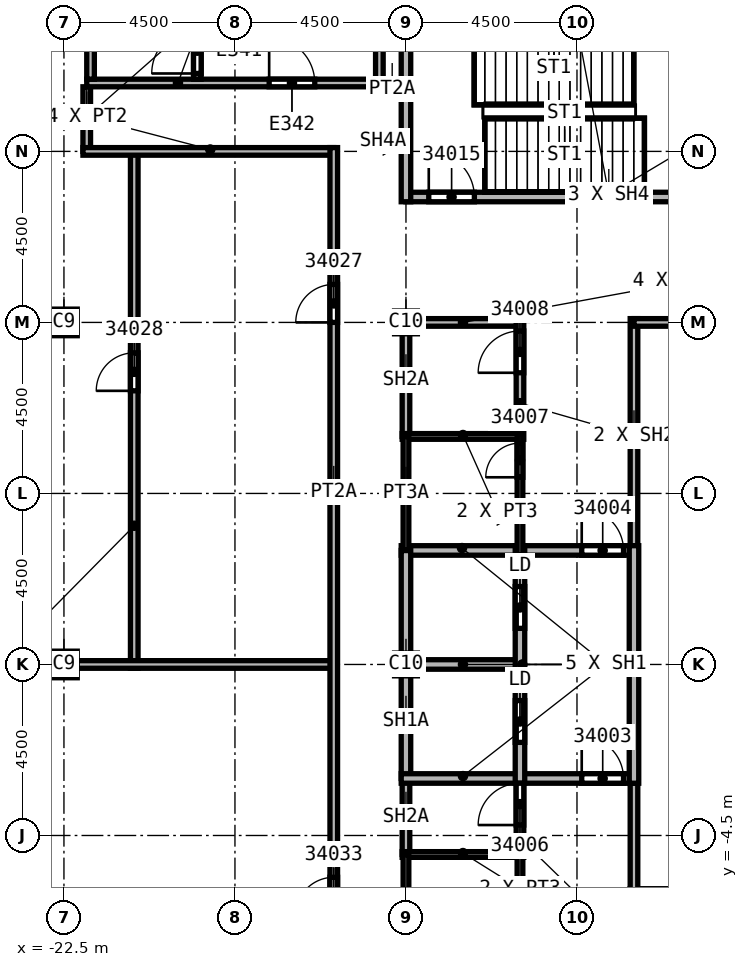
"""IFC4 building model, lengths in metres.
Left out: names, types, materials, properties, quantities, classifications, styles, units other than length and angle.
Written with IfcOpenShell. Run it as: python <this file> out.ifc"""

import sys

from ifc_helpers import new_model, si_unit, direction, frame, frame_2d, origin, origin_2d, place, context, subcontext, project, spatial, rectangle, extrude, element, fill, save


model = new_model("IFC4")
c1 = context("Model", 3, precision=1e-05, world=origin(), true_north=direction((0.0, 1.0)))
c2 = subcontext(c1, "Body", "Model", "MODEL_VIEW")
j1 = project(units=[si_unit("LENGTHUNIT", "METRE"), si_unit("PLANEANGLEUNIT", "RADIAN")], contexts=[c1])
p1 = place(None, origin())
s1 = spatial("IfcSite", under=j1, at=p1, CompositionType="ELEMENT")
p2 = place(p1, origin())
s2 = spatial("IfcBuilding", under=s1, at=p2, CompositionType="ELEMENT")
p3 = place(p2, frame((0.0, 0.0, 366.0)))
s3 = spatial("IfcBuildingStorey", under=s2, at=p3, CompositionType="ELEMENT", Elevation=366.0)
for number, where, z_axis, x_axis in (
    (1, (-22.5, 0.0, 0.0), (0.0, 0.0, 1.0), (1.0, 0.0, 0.0)),
    (2, (-22.5, 9.0, 0.0), (0.0, 0.0, 1.0), (1.0, 0.0, 0.0)),
):
    element("IfcColumn", number, at=place(p3, frame(where, z_axis=z_axis, x_axis=x_axis)), inside=s3, PredefinedType="COLUMN", context=c2, shape_type="SweptSolid", body=[
        extrude(rectangle(XDim=0.7, YDim=0.7, at=origin_2d()), origin(), (0.0, 0.0, 1.0), 9.6),
    ])
for number, where, z_axis, x_axis in (
    (3, (-13.5, 0.0, 0.0), (0.0, 0.0, 1.0), (1.0, 0.0, 0.0)),
    (4, (-13.5, 9.0, 0.0), (0.0, 0.0, 1.0), (1.0, 0.0, 0.0)),
):
    element("IfcColumn", number, at=place(p3, frame(where, z_axis=z_axis, x_axis=x_axis)), inside=s3, PredefinedType="COLUMN", context=c2, shape_type="SweptSolid", body=[
        extrude(rectangle(XDim=0.6, YDim=0.6, at=origin_2d()), origin(), (0.0, 0.0, 1.0), 9.6),
    ])
p4 = place(p3, frame((-21.9, 13.5, 0.0), z_axis=(0.0, 0.0, 1.0), x_axis=(0.0, 1.0, 0.0)))
e5 = element("IfcWall", 5, at=p4, inside=s3, PredefinedType="PARTITIONING", context=c2, shape_type="SweptSolid", body=[
    extrude(rectangle(XDim=1.7, YDim=0.2, at=frame_2d((0.85, 0.0))), origin(), (0.0, 0.0, 1.0), 9.15),
])
p5 = place(p3, frame((-20.65, -0.1, 0.0), z_axis=(0.0, 0.0, 1.0), x_axis=(0.0, 1.0, 0.0)))
e6 = element("IfcWall", 6, at=p5, inside=s3, PredefinedType="PARTITIONING", context=c2, shape_type="SweptSolid", body=[
    extrude(rectangle(XDim=13.6, YDim=0.2, at=frame_2d((6.8, 0.0))), origin(), (0.0, 0.0, 1.0), 9.15),
])
p6 = place(p5, frame((7.3, 0.0, 0.0)))
e7 = element("IfcOpeningElement", 7, at=p6, cuts=e6, PredefinedType="OPENING", context=c2, shape_type="SweptSolid", body=[
    extrude(rectangle(XDim=1.0, YDim=2.1, at=frame_2d((0.5, 1.05))), frame((0.0, 0.1, 0.0), z_axis=(0.0, -1.0, 0.0), x_axis=(1.0, 0.0, 0.0)), (0.0, 0.0, 1.0), 0.2),
])
p7 = place(p3, frame((-15.4, 0.0, 0.0), z_axis=(0.0, 0.0, 1.0), x_axis=(-1.0, 0.0, 0.0)))
e8 = element("IfcWall", 8, at=p7, inside=s3, PredefinedType="PARTITIONING", context=c2, shape_type="SweptSolid", body=[
    extrude(rectangle(XDim=11.15, YDim=0.2, at=frame_2d((5.575, 0.0))), origin(), (0.0, 0.0, 1.0), 9.15),
])
p8 = place(p3, frame((-15.4, 13.5, 0.0), z_axis=(0.0, 0.0, 1.0), x_axis=(-1.0, 0.0, 0.0)))
e9 = element("IfcWall", 9, at=p8, inside=s3, PredefinedType="PARTITIONING", context=c2, shape_type="SweptSolid", body=[
    extrude(rectangle(XDim=6.6, YDim=0.2, at=frame_2d((3.3, 0.0))), origin(), (0.0, 0.0, 1.0), 9.15),
])
p9 = place(p3, frame((-15.4, -27.45, 0.0), z_axis=(0.0, 0.0, 1.0), x_axis=(0.0, 1.0, 0.0)))
e10 = element("IfcWall", 10, at=p9, inside=s3, PredefinedType="PARTITIONING", context=c2, shape_type="SweptSolid", body=[
    extrude(rectangle(XDim=41.05, YDim=0.2, at=frame_2d((20.525, 0.0))), origin(), (0.0, 0.0, 1.0), 5.76),
])
p10 = place(p9, frame((36.45, 0.0, 0.0)))
e11 = element("IfcOpeningElement", 11, at=p10, cuts=e10, PredefinedType="OPENING", context=c2, shape_type="SweptSolid", body=[
    extrude(rectangle(XDim=1.0, YDim=2.1, at=frame_2d((0.5, 1.05))), frame((0.0, 0.1, 0.0), z_axis=(0.0, -1.0, 0.0), x_axis=(1.0, 0.0, 0.0)), (0.0, 0.0, 1.0), 0.2),
])
p11 = place(p9, frame((4.0, 0.0, 0.0)))
e12 = element("IfcOpeningElement", 12, at=p11, cuts=e10, PredefinedType="OPENING", context=c2, shape_type="SweptSolid", body=[
    extrude(rectangle(XDim=1.0, YDim=2.1, at=frame_2d((0.5, 1.05))), frame((0.0, 0.1, 0.0), z_axis=(0.0, -1.0, 0.0), x_axis=(1.0, 0.0, 0.0)), (0.0, 0.0, 1.0), 0.2),
])
p12 = place(p9, frame((10.05, 0.0, 0.0)))
e13 = element("IfcOpeningElement", 13, at=p12, cuts=e10, PredefinedType="OPENING", context=c2, shape_type="SweptSolid", body=[
    extrude(rectangle(XDim=1.0, YDim=2.1, at=frame_2d((0.5, 1.05))), frame((0.0, 0.1, 0.0), z_axis=(0.0, -1.0, 0.0), x_axis=(1.0, 0.0, 0.0)), (0.0, 0.0, 1.0), 0.2),
])
p13 = place(p9, frame((15.9, 0.0, 0.0)))
e14 = element("IfcOpeningElement", 14, at=p13, cuts=e10, PredefinedType="OPENING", context=c2, shape_type="SweptSolid", body=[
    extrude(rectangle(XDim=1.0, YDim=2.1, at=frame_2d((0.5, 1.05))), frame((0.0, 0.1, 0.0), z_axis=(0.0, -1.0, 0.0), x_axis=(1.0, 0.0, 0.0)), (0.0, 0.0, 1.0), 0.2),
])
p14 = place(p9, frame((20.85, 0.0, 0.0)))
e15 = element("IfcOpeningElement", 15, at=p14, cuts=e10, PredefinedType="OPENING", context=c2, shape_type="SweptSolid", body=[
    extrude(rectangle(XDim=1.0, YDim=2.1, at=frame_2d((0.5, 1.05))), frame((0.0, 0.1, 0.0), z_axis=(0.0, -1.0, 0.0), x_axis=(1.0, 0.0, 0.0)), (0.0, 0.0, 1.0), 0.2),
])
p15 = place(p3, frame((-14.1, 15.2, 0.0), z_axis=(0.0, 0.0, 1.0), x_axis=(1.0, 0.0, 0.0)))
e16 = element("IfcWall", 16, at=p15, inside=s3, PredefinedType="PARTITIONING", context=c2, shape_type="SweptSolid", body=[
    extrude(rectangle(XDim=0.725, YDim=0.2, at=frame_2d((0.363, 0.0))), origin(), (0.0, 0.0, 1.0), 5.76),
])
p16 = place(p3, frame((-13.5, -5.0, 0.0), z_axis=(0.0, 0.0, 1.0), x_axis=(0.0, 1.0, 0.0)))
e17 = element("IfcWall", 17, at=p16, inside=s3, PredefinedType="SOLIDWALL", context=c2, shape_type="SweptSolid", body=[
    extrude(rectangle(XDim=2.0, YDim=0.2, at=frame_2d((1.0, 0.0))), origin(), (0.0, 0.0, 1.0), 5.76),
])
p17 = place(p3, frame((-13.5, 6.0, 0.0), z_axis=(0.0, 0.0, 1.0), x_axis=(0.0, 1.0, 0.0)))
e18 = element("IfcWall", 18, at=p17, inside=s3, PredefinedType="SOLIDWALL", context=c2, shape_type="SweptSolid", body=[
    extrude(rectangle(XDim=3.1, YDim=0.2, at=frame_2d((1.55, 0.0))), origin(), (0.0, 0.0, 1.0), 5.76),
])
p18 = place(p3, frame((-13.5, 9.0, 0.0), z_axis=(0.0, 0.0, 1.0), x_axis=(1.0, 0.0, 0.0)))
e19 = element("IfcWall", 19, at=p18, inside=s3, PredefinedType="SOLIDWALL", context=c2, shape_type="SweptSolid", body=[
    extrude(rectangle(XDim=3.0, YDim=0.2, at=frame_2d((1.5, 0.0))), origin(), (0.0, 0.0, 1.0), 8.838),
])
p19 = place(p3, frame((-10.5, -5.075, 0.0), z_axis=(0.0, 0.0, 1.0), x_axis=(0.0, 1.0, 0.0)))
e20 = element("IfcWall", 20, at=p19, inside=s3, PredefinedType="SOLIDWALL", context=c2, shape_type="SweptSolid", body=[
    extrude(rectangle(XDim=2.2, YDim=0.2, at=frame_2d((1.1, 0.0))), origin(), (0.0, 0.0, 1.0), 9.15),
])
p20 = place(p19, frame((0.85, 0.0, 0.0)))
e21 = element("IfcOpeningElement", 21, at=p20, cuts=e20, PredefinedType="OPENING", context=c2, shape_type="SweptSolid", body=[
    extrude(rectangle(XDim=1.1, YDim=2.1, at=frame_2d((0.55, 1.05))), frame((0.0, 0.1, 0.0), z_axis=(0.0, -1.0, 0.0), x_axis=(1.0, 0.0, 0.0)), (0.0, 0.0, 1.0), 0.2),
])
p21 = place(p3, frame((-10.5, 5.925, 0.0), z_axis=(0.0, 0.0, 1.0), x_axis=(0.0, 1.0, 0.0)))
e22 = element("IfcWall", 22, at=p21, inside=s3, PredefinedType="SOLIDWALL", context=c2, shape_type="SweptSolid", body=[
    extrude(rectangle(XDim=3.175, YDim=0.2, at=frame_2d((1.587, 0.0))), origin(), (0.0, 0.0, 1.0), 9.15),
])
p22 = place(p21, frame((1.75, 0.0, 0.0)))
e23 = element("IfcOpeningElement", 23, at=p22, cuts=e22, PredefinedType="OPENING", context=c2, shape_type="SweptSolid", body=[
    extrude(rectangle(XDim=1.1, YDim=2.1, at=frame_2d((0.55, 1.05))), frame((0.0, 0.1, 0.0), z_axis=(0.0, -1.0, 0.0), x_axis=(1.0, 0.0, 0.0)), (0.0, 0.0, 1.0), 0.2),
])
for number, where, z_axis, x_axis in (
    (24, (-7.5, -9.1, 0.0), (0.0, 0.0, 1.0), (0.0, 1.0, 0.0)),
    (25, (-7.5, 2.875, 0.0), (0.0, 0.0, 1.0), (0.0, 1.0, 0.0)),
):
    element("IfcWall", number, at=place(p3, frame(where, z_axis=z_axis, x_axis=x_axis)), inside=s3, PredefinedType="SOLIDWALL", context=c2, shape_type="SweptSolid", body=[
        extrude(rectangle(XDim=6.225, YDim=0.2, at=frame_2d((3.113, 0.0))), origin(), (0.0, 0.0, 1.0), 9.15),
    ])
p23 = place(p3, frame((-7.5, 9.0, 0.0), z_axis=(0.0, 0.0, 1.0), x_axis=(1.0, 0.0, 0.0)))
e26 = element("IfcWall", 26, at=p23, inside=s3, PredefinedType="SOLIDWALL", context=c2, shape_type="SweptSolid", body=[
    extrude(rectangle(XDim=3.0, YDim=0.2, at=frame_2d((1.5, 0.0))), origin(), (0.0, 0.0, 1.0), 8.838),
])
p24 = place(p3, frame((-13.625, 0.0, 0.0), z_axis=(0.0, 0.0, 1.0), x_axis=(1.0, 0.0, 0.0)))
e27 = element("IfcWall", 27, at=p24, inside=s3, PredefinedType="SOLIDWALL", context=c2, shape_type="SweptSolid", body=[
    extrude(rectangle(XDim=3.125, YDim=0.25, at=frame_2d((1.562, 0.0))), origin(), (0.0, 0.0, 1.0), 9.15),
])
p25 = place(p3, frame((-13.625, 3.0, 0.0), z_axis=(0.0, 0.0, 1.0), x_axis=(1.0, 0.0, 0.0)))
e28 = element("IfcWall", 28, at=p25, inside=s3, PredefinedType="SOLIDWALL", context=c2, shape_type="SweptSolid", body=[
    extrude(rectangle(XDim=6.125, YDim=0.25, at=frame_2d((3.062, 0.0))), origin(), (0.0, 0.0, 1.0), 9.15),
])
p26 = place(p25, frame((4.75, 0.0, 0.0)))
e29 = element("IfcOpeningElement", 29, at=p26, cuts=e28, PredefinedType="OPENING", context=c2, shape_type="SweptSolid", body=[
    extrude(rectangle(XDim=1.1, YDim=2.1, at=frame_2d((0.55, 1.05))), frame((0.0, 0.125, 0.0), z_axis=(0.0, -1.0, 0.0), x_axis=(1.0, 0.0, 0.0)), (0.0, 0.0, 1.0), 0.25),
])
p27 = place(p3, frame((-13.5, -3.0, 0.0), z_axis=(0.0, 0.0, 1.0), x_axis=(0.0, 1.0, 0.0)))
e30 = element("IfcWall", 30, at=p27, inside=s3, PredefinedType="SOLIDWALL", context=c2, shape_type="SweptSolid", body=[
    extrude(rectangle(XDim=6.0, YDim=0.25, at=frame_2d((3.0, 0.0))), origin(), (0.0, 0.0, 1.0), 5.76),
])
p28 = place(p3, frame((-13.625, -3.0, 0.0), z_axis=(0.0, 0.0, 1.0), x_axis=(1.0, 0.0, 0.0)))
e31 = element("IfcWall", 31, at=p28, inside=s3, PredefinedType="SOLIDWALL", context=c2, shape_type="SweptSolid", body=[
    extrude(rectangle(XDim=6.125, YDim=0.25, at=frame_2d((3.062, 0.0))), origin(), (0.0, 0.0, 1.0), 9.15),
])
p29 = place(p28, frame((4.75, 0.0, 0.0)))
e32 = element("IfcOpeningElement", 32, at=p29, cuts=e31, PredefinedType="OPENING", context=c2, shape_type="SweptSolid", body=[
    extrude(rectangle(XDim=1.1, YDim=2.1, at=frame_2d((0.55, 1.05))), frame((0.0, 0.125, 0.0), z_axis=(0.0, -1.0, 0.0), x_axis=(1.0, 0.0, 0.0)), (0.0, 0.0, 1.0), 0.25),
])
p30 = place(p3, frame((-10.5, -3.125, 0.0), z_axis=(0.0, 0.0, 1.0), x_axis=(0.0, 1.0, 0.0)))
e33 = element("IfcWall", 33, at=p30, inside=s3, PredefinedType="SOLIDWALL", context=c2, shape_type="SweptSolid", body=[
    extrude(rectangle(XDim=6.25, YDim=0.25, at=frame_2d((3.125, 0.0))), origin(), (0.0, 0.0, 1.0), 9.15),
])
p31 = place(p30, frame((1.075, 0.0, 0.0)))
e34 = element("IfcOpeningElement", 34, at=p31, cuts=e33, PredefinedType="OPENING", context=c2, shape_type="SweptSolid", body=[
    extrude(rectangle(XDim=1.1, YDim=2.1, at=frame_2d((0.55, 1.05))), frame((0.0, 0.125, 0.0), z_axis=(0.0, -1.0, 0.0), x_axis=(1.0, 0.0, 0.0)), (0.0, 0.0, 1.0), 0.25),
])
p32 = place(p30, frame((4.075, 0.0, 0.0)))
e35 = element("IfcOpeningElement", 35, at=p32, cuts=e33, PredefinedType="OPENING", context=c2, shape_type="SweptSolid", body=[
    extrude(rectangle(XDim=1.1, YDim=2.1, at=frame_2d((0.55, 1.05))), frame((0.0, 0.125, 0.0), z_axis=(0.0, -1.0, 0.0), x_axis=(1.0, 0.0, 0.0)), (0.0, 0.0, 1.0), 0.25),
])
p33 = place(p3, frame((-7.5, -3.125, 0.0), z_axis=(0.0, 0.0, 1.0), x_axis=(0.0, 1.0, 0.0)))
e36 = element("IfcWall", 36, at=p33, inside=s3, PredefinedType="SOLIDWALL", context=c2, shape_type="SweptSolid", body=[
    extrude(rectangle(XDim=6.25, YDim=0.25, at=frame_2d((3.125, 0.0))), origin(), (0.0, 0.0, 1.0), 9.15),
])
p34 = place(p3, frame((-13.5, 12.3, 0.0), z_axis=(0.0, 0.0, 1.0), x_axis=(1.0, 0.0, 0.0)))
e37 = element("IfcWall", 37, at=p34, inside=s3, PredefinedType="SOLIDWALL", context=c2, shape_type="SweptSolid", body=[
    extrude(rectangle(XDim=9.125, YDim=0.25, at=frame_2d((4.562, 0.0))), origin(), (0.0, 0.0, 1.0), 9.15),
])
p35 = place(p34, frame((0.6, 0.0, 0.0)))
e38 = element("IfcOpeningElement", 38, at=p35, cuts=e37, PredefinedType="OPENING", context=c2, shape_type="SweptSolid", body=[
    extrude(rectangle(XDim=1.2, YDim=2.1, at=frame_2d((0.6, 1.05))), frame((0.0, 0.125, 0.0), z_axis=(0.0, -1.0, 0.0), x_axis=(1.0, 0.0, 0.0)), (0.0, 0.0, 1.0), 0.25),
])
p36 = place(p3, frame((-13.5, 12.175, 0.0), z_axis=(0.0, 0.0, 1.0), x_axis=(0.0, 1.0, 0.0)))
e39 = element("IfcWall", 39, at=p36, inside=s3, PredefinedType="SOLIDWALL", context=c2, shape_type="SweptSolid", body=[
    extrude(rectangle(XDim=4.75, YDim=0.25, at=frame_2d((2.375, 0.0))), origin(), (0.0, 0.0, 1.0), 5.76),
])
for number, where, z_axis, x_axis in (
    (40, (-13.6, -5.0, 0.0), (0.0, 0.0, 1.0), (1.0, 0.0, 0.0)),
    (41, (-13.6, 6.0, 0.0), (0.0, 0.0, 1.0), (1.0, 0.0, 0.0)),
):
    element("IfcWall", number, at=place(p3, frame(where, z_axis=z_axis, x_axis=x_axis)), inside=s3, PredefinedType="PARTITIONING", context=c2, shape_type="SweptSolid", body=[
        extrude(rectangle(XDim=3.1, YDim=0.15, at=frame_2d((1.55, 0.0))), origin(), (0.0, 0.0, 1.0), 9.15),
    ])
p37 = place(p3, frame((-13.5, -9.075, 0.0), z_axis=(0.0, 0.0, 1.0), x_axis=(0.0, 1.0, 0.0)))
e42 = element("IfcWall", 42, at=p37, inside=s3, PredefinedType="PARTITIONING", context=c2, shape_type="SweptSolid", body=[
    extrude(rectangle(XDim=4.075, YDim=0.15, at=frame_2d((2.038, 0.0))), origin(), (0.0, 0.0, 1.0), 5.76),
])
p38 = place(p3, frame((-13.5, 3.0, 0.0), z_axis=(0.0, 0.0, 1.0), x_axis=(0.0, 1.0, 0.0)))
e43 = element("IfcWall", 43, at=p38, inside=s3, PredefinedType="PARTITIONING", context=c2, shape_type="SweptSolid", body=[
    extrude(rectangle(XDim=3.0, YDim=0.15, at=frame_2d((1.5, 0.0))), origin(), (0.0, 0.0, 1.0), 5.76),
])
p39 = place(p3, frame((-10.5, -9.075, 0.0), z_axis=(0.0, 0.0, 1.0), x_axis=(0.0, 1.0, 0.0)))
e44 = element("IfcWall", 44, at=p39, inside=s3, PredefinedType="PARTITIONING", context=c2, shape_type="SweptSolid", body=[
    extrude(rectangle(XDim=4.15, YDim=0.15, at=frame_2d((2.075, 0.0))), origin(), (0.0, 0.0, 1.0), 9.15),
])
p40 = place(p39, frame((0.25, 0.0, 0.0)))
e45 = element("IfcOpeningElement", 45, at=p40, cuts=e44, PredefinedType="OPENING", context=c2, shape_type="SweptSolid", body=[
    extrude(rectangle(XDim=0.9, YDim=2.1, at=frame_2d((0.45, 1.05))), frame((0.0, 0.075, 0.0), z_axis=(0.0, -1.0, 0.0), x_axis=(1.0, 0.0, 0.0)), (0.0, 0.0, 1.0), 0.15),
])
p41 = place(p3, frame((-10.5, 2.875, 0.0), z_axis=(0.0, 0.0, 1.0), x_axis=(0.0, 1.0, 0.0)))
e46 = element("IfcWall", 46, at=p41, inside=s3, PredefinedType="PARTITIONING", context=c2, shape_type="SweptSolid", body=[
    extrude(rectangle(XDim=3.2, YDim=0.15, at=frame_2d((1.6, 0.0))), origin(), (0.0, 0.0, 1.0), 9.15),
])
p42 = place(p41, frame((2.05, 0.0, 0.0)))
e47 = element("IfcOpeningElement", 47, at=p42, cuts=e46, PredefinedType="OPENING", context=c2, shape_type="SweptSolid", body=[
    extrude(rectangle(XDim=0.9, YDim=2.1, at=frame_2d((0.45, 1.05))), frame((0.0, 0.075, 0.0), z_axis=(0.0, -1.0, 0.0), x_axis=(1.0, 0.0, 0.0)), (0.0, 0.0, 1.0), 0.15),
])
p43 = place(p3, frame((-21.9, 15.3, 0.0), z_axis=(0.0, 0.0, 1.0), x_axis=(1.0, 0.0, 0.0)))
e48 = element("IfcWall", 48, at=p43, inside=s3, PredefinedType="SOLIDWALL", context=c2, shape_type="SweptSolid", body=[
    extrude(rectangle(XDim=8.275, YDim=0.2, at=frame_2d((4.137, 0.0))), origin(), (0.0, 0.0, 1.0), 9.15),
])
p44 = place(p43, frame((4.8, 0.0, 0.0)))
e49 = element("IfcOpeningElement", 49, at=p44, cuts=e48, PredefinedType="OPENING", context=c2, shape_type="SweptSolid", body=[
    extrude(rectangle(XDim=1.2, YDim=2.1, at=frame_2d((0.6, 1.05))), frame((0.0, 0.1, 0.0), z_axis=(0.0, -1.0, 0.0), x_axis=(1.0, 0.0, 0.0)), (0.0, 0.0, 1.0), 0.2),
])
for number, where, z_axis, x_axis in (
    (50, (-21.8, 15.4, 0.0), (0.0, 0.0, 1.0), (0.0, 1.0, 0.0)),
    (51, (-14.2, 15.4, 0.0), (0.0, 0.0, 1.0), (0.0, 1.0, 0.0)),
):
    element("IfcWall", number, at=place(p3, frame(where, z_axis=z_axis, x_axis=x_axis)), inside=s3, PredefinedType="SOLIDWALL", context=c2, shape_type="SweptSolid", body=[
        extrude(rectangle(XDim=5.9, YDim=0.2, at=frame_2d((2.95, 0.0))), origin(), (0.0, 0.0, 1.0), 9.15),
    ])
p45 = place(p3, frame((-18.99, 15.4, 0.0), z_axis=(0.0, 0.0, 1.0), x_axis=(0.0, 1.0, 0.0)))
e52 = element("IfcWall", 52, at=p45, inside=s3, PredefinedType="SOLIDWALL", context=c2, shape_type="SweptSolid", body=[
    extrude(rectangle(XDim=5.9, YDim=0.2, at=frame_2d((2.95, 0.0))), origin(), (0.0, 0.0, 1.0), 9.15),
])
p46 = place(p45, frame((0.15, 0.0, 0.0)))
e53 = element("IfcOpeningElement", 53, at=p46, cuts=e52, PredefinedType="OPENING", context=c2, shape_type="SweptSolid", body=[
    extrude(rectangle(XDim=1.2, YDim=2.1, at=frame_2d((0.6, 1.05))), frame((0.0, 0.1, 0.0), z_axis=(0.0, -1.0, 0.0), x_axis=(1.0, 0.0, 0.0)), (0.0, 0.0, 1.0), 0.2),
])
p47 = place(p29, origin())
e54 = element("IfcDoor", 54, at=p47, inside=s3, OperationType="SINGLE_SWING_RIGHT", PredefinedType="DOOR", context=c2, shape_type="SweptSolid", body=[
    extrude(rectangle(XDim=1.1, YDim=2.1, at=frame_2d((0.55, 1.05))), frame((0.0, 0.025, 0.0), z_axis=(0.0, -1.0, 0.0), x_axis=(1.0, 0.0, 0.0)), (0.0, 0.0, 1.0), 0.05),
])
fill(e32, e54)
p48 = place(p26, origin())
e55 = element("IfcDoor", 55, at=p48, inside=s3, OperationType="SINGLE_SWING_LEFT", PredefinedType="DOOR", context=c2, shape_type="SweptSolid", body=[
    extrude(rectangle(XDim=1.1, YDim=2.1, at=frame_2d((0.55, 1.05))), frame((0.0, 0.025, 0.0), z_axis=(0.0, -1.0, 0.0), x_axis=(1.0, 0.0, 0.0)), (0.0, 0.0, 1.0), 0.05),
])
fill(e29, e55)
p49 = place(p20, origin())
e56 = element("IfcDoor", 56, at=p49, inside=s3, OperationType="SINGLE_SWING_LEFT", PredefinedType="DOOR", context=c2, shape_type="SweptSolid", body=[
    extrude(rectangle(XDim=1.1, YDim=2.1, at=frame_2d((0.55, 1.05))), frame((0.0, 0.025, 0.0), z_axis=(0.0, -1.0, 0.0), x_axis=(1.0, 0.0, 0.0)), (0.0, 0.0, 1.0), 0.05),
])
fill(e21, e56)
p50 = place(p42, origin())
e57 = element("IfcDoor", 57, at=p50, inside=s3, OperationType="SINGLE_SWING_RIGHT", PredefinedType="DOOR", context=c2, shape_type="SweptSolid", body=[
    extrude(rectangle(XDim=0.9, YDim=2.1, at=frame_2d((0.45, 1.05))), frame((0.0, 0.025, 0.0), z_axis=(0.0, -1.0, 0.0), x_axis=(1.0, 0.0, 0.0)), (0.0, 0.0, 1.0), 0.05),
])
fill(e47, e57)
p51 = place(p22, origin())
e58 = element("IfcDoor", 58, at=p51, inside=s3, OperationType="SINGLE_SWING_LEFT", PredefinedType="DOOR", context=c2, shape_type="SweptSolid", body=[
    extrude(rectangle(XDim=1.1, YDim=2.1, at=frame_2d((0.55, 1.05))), frame((0.0, 0.025, 0.0), z_axis=(0.0, -1.0, 0.0), x_axis=(1.0, 0.0, 0.0)), (0.0, 0.0, 1.0), 0.05),
])
fill(e23, e58)
p52 = place(p35, origin())
e59 = element("IfcDoor", 59, at=p52, inside=s3, OperationType="SINGLE_SWING_RIGHT", PredefinedType="DOOR", context=c2, shape_type="SweptSolid", body=[
    extrude(rectangle(XDim=1.2, YDim=2.1, at=frame_2d((0.6, 1.05))), frame((0.0, 0.025, 0.0), z_axis=(0.0, -1.0, 0.0), x_axis=(1.0, 0.0, 0.0)), (0.0, 0.0, 1.0), 0.05),
])
fill(e38, e59)
p53 = place(p10, origin())
e60 = element("IfcDoor", 60, at=p53, inside=s3, OperationType="SINGLE_SWING_RIGHT", PredefinedType="DOOR", context=c2, shape_type="SweptSolid", body=[
    extrude(rectangle(XDim=1.0, YDim=2.1, at=frame_2d((0.5, 1.05))), frame((0.0, 0.025, 0.0), z_axis=(0.0, -1.0, 0.0), x_axis=(1.0, 0.0, 0.0)), (0.0, 0.0, 1.0), 0.05),
])
fill(e11, e60)
p54 = place(p6, origin())
e61 = element("IfcDoor", 61, at=p54, inside=s3, OperationType="SINGLE_SWING_LEFT", PredefinedType="DOOR", context=c2, shape_type="SweptSolid", body=[
    extrude(rectangle(XDim=1.0, YDim=2.1, at=frame_2d((0.5, 1.05))), frame((0.0, 0.025, 0.0), z_axis=(0.0, -1.0, 0.0), x_axis=(1.0, 0.0, 0.0)), (0.0, 0.0, 1.0), 0.05),
])
fill(e7, e61)
p55 = place(p14, origin())
e62 = element("IfcDoor", 62, at=p55, inside=s3, OperationType="SINGLE_SWING_RIGHT", PredefinedType="DOOR", context=c2, shape_type="SweptSolid", body=[
    extrude(rectangle(XDim=1.0, YDim=2.1, at=frame_2d((0.5, 1.05))), frame((0.0, 0.025, 0.0), z_axis=(0.0, -1.0, 0.0), x_axis=(1.0, 0.0, 0.0)), (0.0, 0.0, 1.0), 0.05),
])
fill(e15, e62)
p56 = place(p31, origin())
e63 = element("IfcDoor", 63, at=p56, inside=s3, OperationType="SLIDING_TO_LEFT", PredefinedType="DOOR", context=c2, shape_type="SweptSolid", body=[
    extrude(rectangle(XDim=1.1, YDim=2.1, at=frame_2d((0.55, 1.05))), frame((0.0, 0.025, 0.0), z_axis=(0.0, -1.0, 0.0), x_axis=(1.0, 0.0, 0.0)), (0.0, 0.0, 1.0), 0.05),
])
fill(e34, e63)
p57 = place(p32, origin())
e64 = element("IfcDoor", 64, at=p57, inside=s3, OperationType="SLIDING_TO_LEFT", PredefinedType="DOOR", context=c2, shape_type="SweptSolid", body=[
    extrude(rectangle(XDim=1.1, YDim=2.1, at=frame_2d((0.55, 1.05))), frame((0.0, 0.025, 0.0), z_axis=(0.0, -1.0, 0.0), x_axis=(1.0, 0.0, 0.0)), (0.0, 0.0, 1.0), 0.05),
])
fill(e35, e64)
p58 = place(p46, origin())
e65 = element("IfcDoor", 65, at=p58, inside=s3, OperationType="SINGLE_SWING_LEFT", PredefinedType="DOOR", context=c2, shape_type="SweptSolid", body=[
    extrude(rectangle(XDim=1.2, YDim=2.1, at=frame_2d((0.6, 1.05))), frame((0.0, 0.025, 0.0), z_axis=(0.0, -1.0, 0.0), x_axis=(1.0, 0.0, 0.0)), (0.0, 0.0, 1.0), 0.05),
])
fill(e53, e65)
p59 = place(p44, origin())
e66 = element("IfcDoor", 66, at=p59, inside=s3, OperationType="SINGLE_SWING_RIGHT", PredefinedType="DOOR", context=c2, shape_type="SweptSolid", body=[
    extrude(rectangle(XDim=1.2, YDim=2.1, at=frame_2d((0.6, 1.05))), frame((0.0, 0.025, 0.0), z_axis=(0.0, -1.0, 0.0), x_axis=(1.0, 0.0, 0.0)), (0.0, 0.0, 1.0), 0.05),
])
fill(e49, e66)
save(model, sys.argv[1])
